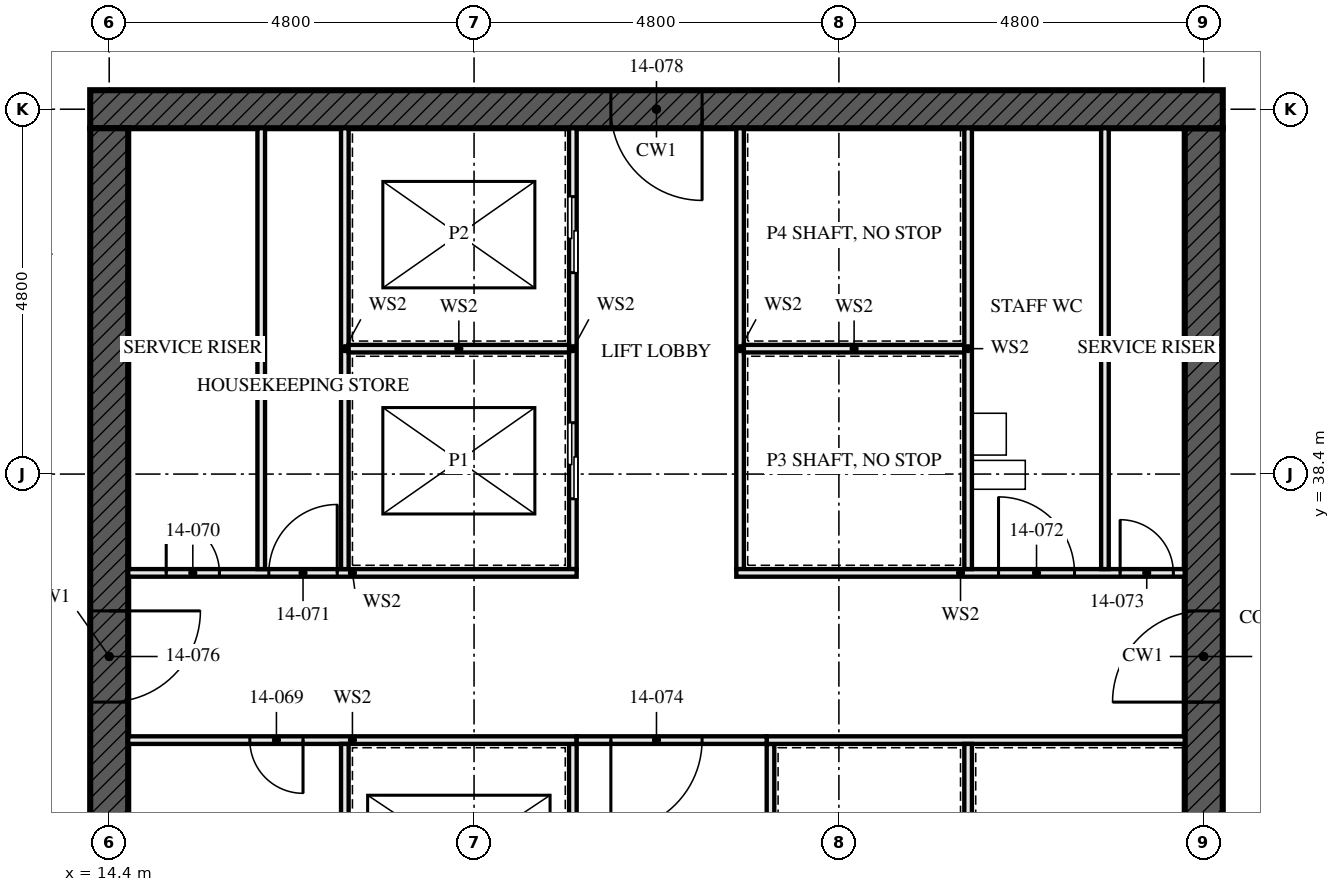
"""IFC4 building model, lengths in metres.
Left out: names, types, materials, properties, quantities, classifications, styles, units other than length and angle.
Written with IfcOpenShell. Run it as: python <this file> out.ifc"""

import sys

from ifc_helpers import new_model, si_unit, direction, frame, frame_2d, origin, place, context, subcontext, project, spatial, rectangle, extrude, element, fill, save


model = new_model("IFC4")
c1 = context("Model", 3, precision=1e-05, world=origin(), true_north=direction((0.0, 1.0)))
c2 = subcontext(c1, "Body", "Model", "MODEL_VIEW")
j1 = project(units=[si_unit("LENGTHUNIT", "METRE"), si_unit("PLANEANGLEUNIT", "RADIAN")], contexts=[c1])
p1 = place(None, origin())
s1 = spatial("IfcSite", under=j1, at=p1, CompositionType="ELEMENT")
p2 = place(p1, origin())
s2 = spatial("IfcBuilding", under=s1, at=p2, CompositionType="ELEMENT")
p3 = place(p2, frame((0.0, 0.0, 55.0)))
s3 = spatial("IfcBuildingStorey", under=s2, at=p3, CompositionType="ELEMENT", Elevation=55.0)
p4 = place(p3, frame((29.05, 43.2, -0.17), z_axis=(0.0, 0.0, 1.0), x_axis=(-1.0, 0.0, 0.0)))
e1 = element("IfcWall", 1, at=p4, inside=s3, PredefinedType="SHEAR", context=c2, shape_type="SweptSolid", body=[
    extrude(rectangle(XDim=14.9, YDim=0.5, at=frame_2d((7.45, 0.0))), origin(), (0.0, 0.0, 1.0), 3.5),
])
p5 = place(p4, frame((6.85, 0.0, 0.17)))
e2 = element("IfcOpeningElement", 2, at=p5, cuts=e1, PredefinedType="OPENING", context=c2, shape_type="SweptSolid", body=[
    extrude(rectangle(XDim=1.2, YDim=2.1, at=frame_2d((0.6, 1.05))), frame((0.0, 0.26, 0.0), z_axis=(0.0, -1.0, 0.0), x_axis=(1.0, 0.0, 0.0)), (0.0, 0.0, 1.0), 0.521),
])
p6 = place(p3, frame((14.4, 42.95, -0.17), z_axis=(0.0, 0.0, 1.0), x_axis=(0.0, -1.0, 0.0)))
e3 = element("IfcWall", 3, at=p6, inside=s3, PredefinedType="SHEAR", context=c2, shape_type="SweptSolid", body=[
    extrude(rectangle(XDim=13.9, YDim=0.5, at=frame_2d((6.95, 0.0))), origin(), (0.0, 0.0, 1.0), 3.5),
])
p7 = place(p6, frame((6.35, 0.0, 0.17)))
e4 = element("IfcOpeningElement", 4, at=p7, cuts=e3, PredefinedType="OPENING", context=c2, shape_type="SweptSolid", body=[
    extrude(rectangle(XDim=1.2, YDim=2.1, at=frame_2d((0.6, 1.05))), frame((0.0, 0.26, 0.0), z_axis=(0.0, -1.0, 0.0), x_axis=(1.0, 0.0, 0.0)), (0.0, 0.0, 1.0), 0.521),
])
p8 = place(p3, frame((28.8, 29.05, -0.17), z_axis=(0.0, 0.0, 1.0), x_axis=(0.0, 1.0, 0.0)))
e5 = element("IfcWall", 5, at=p8, inside=s3, PredefinedType="SHEAR", context=c2, shape_type="SweptSolid", body=[
    extrude(rectangle(XDim=13.9, YDim=0.5, at=frame_2d((6.95, 0.0))), origin(), (0.0, 0.0, 1.0), 3.5),
])
p9 = place(p8, frame((6.35, 0.0, 0.17)))
e6 = element("IfcOpeningElement", 6, at=p9, cuts=e5, PredefinedType="OPENING", context=c2, shape_type="SweptSolid", body=[
    extrude(rectangle(XDim=1.2, YDim=2.1, at=frame_2d((0.6, 1.05))), frame((0.0, 0.26, 0.0), z_axis=(0.0, -1.0, 0.0), x_axis=(1.0, 0.0, 0.0)), (0.0, 0.0, 1.0), 0.521),
])
for number, where, z_axis, x_axis in (
    (7, (16.4, 37.15, 0.0), (0.0, 0.0, 1.0), (0.0, 1.0, 0.0)),
    (8, (27.5, 37.15, 0.0), (0.0, 0.0, 1.0), (0.0, 1.0, 0.0)),
):
    element("IfcWall", number, at=place(p3, frame(where, z_axis=z_axis, x_axis=x_axis)), inside=s3, PredefinedType="SOLIDWALL", context=c2, shape_type="SweptSolid", body=[
        extrude(rectangle(XDim=5.8, YDim=0.1, at=frame_2d((2.9, 0.0))), origin(), (0.0, 0.0, 1.0), 3.33),
    ])
p10 = place(p3, frame((20.5, 29.05, 0.0), z_axis=(0.0, 0.0, 1.0), x_axis=(0.0, 1.0, 0.0)))
e9 = element("IfcWall", 9, at=p10, inside=s3, PredefinedType="SOLIDWALL", context=c2, shape_type="SweptSolid", body=[
    extrude(rectangle(XDim=5.8, YDim=0.1, at=frame_2d((2.9, 0.0))), origin(), (0.0, 0.0, 1.0), 3.33),
])
p11 = place(p10, frame((0.8, 0.0, 0.0)))
e10 = element("IfcOpeningElement", 10, at=p11, cuts=e9, PredefinedType="OPENING", context=c2, shape_type="SweptSolid", body=[
    extrude(rectangle(XDim=1.1, YDim=2.3, at=frame_2d((0.55, 1.15))), frame((0.0, 0.061, 0.0), z_axis=(0.0, -1.0, 0.0), x_axis=(1.0, 0.0, 0.0)), (0.0, 0.0, 1.0), 0.121),
])
p12 = place(p10, frame((3.775, 0.0, 0.0)))
e11 = element("IfcOpeningElement", 11, at=p12, cuts=e9, PredefinedType="OPENING", context=c2, shape_type="SweptSolid", body=[
    extrude(rectangle(XDim=1.1, YDim=2.3, at=frame_2d((0.55, 1.15))), frame((0.0, 0.061, 0.0), z_axis=(0.0, -1.0, 0.0), x_axis=(1.0, 0.0, 0.0)), (0.0, 0.0, 1.0), 0.121),
])
p13 = place(p3, frame((20.5, 37.15, 0.0), z_axis=(0.0, 0.0, 1.0), x_axis=(0.0, 1.0, 0.0)))
e12 = element("IfcWall", 12, at=p13, inside=s3, PredefinedType="SOLIDWALL", context=c2, shape_type="SweptSolid", body=[
    extrude(rectangle(XDim=5.8, YDim=0.1, at=frame_2d((2.9, 0.0))), origin(), (0.0, 0.0, 1.0), 3.33),
])
p14 = place(p13, frame((0.925, 0.0, 0.0)))
e13 = element("IfcOpeningElement", 13, at=p14, cuts=e12, PredefinedType="OPENING", context=c2, shape_type="SweptSolid", body=[
    extrude(rectangle(XDim=1.0, YDim=2.1, at=frame_2d((0.5, 1.05))), frame((0.0, 0.061, 0.0), z_axis=(0.0, -1.0, 0.0), x_axis=(1.0, 0.0, 0.0)), (0.0, 0.0, 1.0), 0.121),
])
p15 = place(p13, frame((3.9, 0.0, 0.0)))
e14 = element("IfcOpeningElement", 14, at=p15, cuts=e12, PredefinedType="OPENING", context=c2, shape_type="SweptSolid", body=[
    extrude(rectangle(XDim=1.0, YDim=2.1, at=frame_2d((0.5, 1.05))), frame((0.0, 0.061, 0.0), z_axis=(0.0, -1.0, 0.0), x_axis=(1.0, 0.0, 0.0)), (0.0, 0.0, 1.0), 0.121),
])
p16 = place(p3, frame((22.7, 37.15, 0.0), z_axis=(0.0, 0.0, 1.0), x_axis=(0.0, 1.0, 0.0)))
e15 = element("IfcWall", 15, at=p16, inside=s3, PredefinedType="SOLIDWALL", context=c2, shape_type="SweptSolid", body=[
    extrude(rectangle(XDim=5.8, YDim=0.1, at=frame_2d((2.9, 0.0))), origin(), (0.0, 0.0, 1.0), 3.33),
])
p17 = place(p3, frame((23.1, 29.05, 0.0), z_axis=(0.0, 0.0, 1.0), x_axis=(0.0, 1.0, 0.0)))
e16 = element("IfcWall", 16, at=p17, inside=s3, PredefinedType="SOLIDWALL", context=c2, shape_type="SweptSolid", body=[
    extrude(rectangle(XDim=5.8, YDim=0.1, at=frame_2d((2.9, 0.0))), origin(), (0.0, 0.0, 1.0), 3.33),
])
p18 = place(p17, frame((1.0, 0.0, 0.0)))
e17 = element("IfcOpeningElement", 17, at=p18, cuts=e16, PredefinedType="OPENING", context=c2, shape_type="SweptSolid", body=[
    extrude(rectangle(XDim=0.7, YDim=2.1, at=frame_2d((0.35, 1.05))), frame((0.0, 0.061, 0.0), z_axis=(0.0, -1.0, 0.0), x_axis=(1.0, 0.0, 0.0)), (0.0, 0.0, 1.0), 0.121),
])
p19 = place(p3, frame((14.65, 34.9, 0.0), z_axis=(0.0, 0.0, 1.0), x_axis=(1.0, 0.0, 0.0)))
e18 = element("IfcWall", 18, at=p19, inside=s3, PredefinedType="SOLIDWALL", context=c2, shape_type="SweptSolid", body=[
    extrude(rectangle(XDim=5.9, YDim=0.1, at=frame_2d((2.95, 0.0))), origin(), (0.0, 0.0, 1.0), 3.33),
])
p20 = place(p19, frame((1.6, 0.0, 0.0)))
e19 = element("IfcOpeningElement", 19, at=p20, cuts=e18, PredefinedType="OPENING", context=c2, shape_type="SweptSolid", body=[
    extrude(rectangle(XDim=0.7, YDim=2.1, at=frame_2d((0.35, 1.05))), frame((0.0, 0.061, 0.0), z_axis=(0.0, -1.0, 0.0), x_axis=(1.0, 0.0, 0.0)), (0.0, 0.0, 1.0), 0.121),
])
p21 = place(p3, frame((23.05, 34.9, 0.0), z_axis=(0.0, 0.0, 1.0), x_axis=(1.0, 0.0, 0.0)))
e20 = element("IfcWall", 20, at=p21, inside=s3, PredefinedType="SOLIDWALL", context=c2, shape_type="SweptSolid", body=[
    extrude(rectangle(XDim=5.5, YDim=0.1, at=frame_2d((2.75, 0.0))), origin(), (0.0, 0.0, 1.0), 3.33),
])
p22 = place(p3, frame((14.65, 37.1, 0.0), z_axis=(0.0, 0.0, 1.0), x_axis=(1.0, 0.0, 0.0)))
e21 = element("IfcWall", 21, at=p22, inside=s3, PredefinedType="SOLIDWALL", context=c2, shape_type="SweptSolid", body=[
    extrude(rectangle(XDim=5.9, YDim=0.1, at=frame_2d((2.95, 0.0))), origin(), (0.0, 0.0, 1.0), 3.33),
])
p23 = place(p22, frame((0.5, 0.0, 0.0)))
e22 = element("IfcOpeningElement", 22, at=p23, cuts=e21, PredefinedType="OPENING", context=c2, shape_type="SweptSolid", body=[
    extrude(rectangle(XDim=0.7, YDim=2.1, at=frame_2d((0.35, 1.05))), frame((0.0, 0.061, 0.0), z_axis=(0.0, -1.0, 0.0), x_axis=(1.0, 0.0, 0.0)), (0.0, 0.0, 1.0), 0.121),
])
p24 = place(p22, frame((1.85, 0.0, 0.0)))
e23 = element("IfcOpeningElement", 23, at=p24, cuts=e21, PredefinedType="OPENING", context=c2, shape_type="SweptSolid", body=[
    extrude(rectangle(XDim=0.9, YDim=2.1, at=frame_2d((0.45, 1.05))), frame((0.0, 0.061, 0.0), z_axis=(0.0, -1.0, 0.0), x_axis=(1.0, 0.0, 0.0)), (0.0, 0.0, 1.0), 0.121),
])
p25 = place(p3, frame((22.65, 37.1, 0.0), z_axis=(0.0, 0.0, 1.0), x_axis=(1.0, 0.0, 0.0)))
e24 = element("IfcWall", 24, at=p25, inside=s3, PredefinedType="SOLIDWALL", context=c2, shape_type="SweptSolid", body=[
    extrude(rectangle(XDim=5.9, YDim=0.1, at=frame_2d((2.95, 0.0))), origin(), (0.0, 0.0, 1.0), 3.33),
])
p26 = place(p25, frame((3.45, 0.0, 0.0)))
e25 = element("IfcOpeningElement", 25, at=p26, cuts=e24, PredefinedType="OPENING", context=c2, shape_type="SweptSolid", body=[
    extrude(rectangle(XDim=1.0, YDim=2.1, at=frame_2d((0.5, 1.05))), frame((0.0, 0.061, 0.0), z_axis=(0.0, -1.0, 0.0), x_axis=(1.0, 0.0, 0.0)), (0.0, 0.0, 1.0), 0.121),
])
p27 = place(p25, frame((5.05, 0.0, 0.0)))
e26 = element("IfcOpeningElement", 26, at=p27, cuts=e24, PredefinedType="OPENING", context=c2, shape_type="SweptSolid", body=[
    extrude(rectangle(XDim=0.7, YDim=2.1, at=frame_2d((0.35, 1.05))), frame((0.0, 0.061, 0.0), z_axis=(0.0, -1.0, 0.0), x_axis=(1.0, 0.0, 0.0)), (0.0, 0.0, 1.0), 0.121),
])
p28 = place(p3, frame((20.55, 34.9, 0.0), z_axis=(0.0, 0.0, 1.0), x_axis=(1.0, 0.0, 0.0)))
e27 = element("IfcWall", 27, at=p28, inside=s3, PredefinedType="SOLIDWALL", context=c2, shape_type="SweptSolid", body=[
    extrude(rectangle(XDim=2.5, YDim=0.1, at=frame_2d((1.25, 0.0))), origin(), (0.0, 0.0, 1.0), 3.33),
])
p29 = place(p28, frame((0.45, 0.0, 0.0)))
e28 = element("IfcOpeningElement", 28, at=p29, cuts=e27, PredefinedType="OPENING", context=c2, shape_type="SweptSolid", body=[
    extrude(rectangle(XDim=1.2, YDim=2.1, at=frame_2d((0.6, 1.05))), frame((0.0, 0.061, 0.0), z_axis=(0.0, -1.0, 0.0), x_axis=(1.0, 0.0, 0.0)), (0.0, 0.0, 1.0), 0.121),
])
for number, where, z_axis, x_axis in (
    (29, (17.5, 29.05, 0.0), (0.0, 0.0, 1.0), (0.0, 1.0, 0.0)),
    (30, (17.5, 37.15, 0.0), (0.0, 0.0, 1.0), (0.0, 1.0, 0.0)),
):
    element("IfcWall", number, at=place(p3, frame(where, z_axis=z_axis, x_axis=x_axis)), inside=s3, PredefinedType="SOLIDWALL", context=c2, shape_type="SweptSolid", body=[
        extrude(rectangle(XDim=5.8, YDim=0.1, at=frame_2d((2.9, 0.0))), origin(), (0.0, 0.0, 1.0), 3.33),
    ])
for number, where, z_axis, x_axis in (
    (31, (17.55, 40.05, 0.0), (0.0, 0.0, 1.0), (1.0, 0.0, 0.0)),
    (32, (22.75, 40.05, 0.0), (0.0, 0.0, 1.0), (1.0, 0.0, 0.0)),
):
    element("IfcWall", number, at=place(p3, frame(where, z_axis=z_axis, x_axis=x_axis)), inside=s3, PredefinedType="SOLIDWALL", context=c2, shape_type="SweptSolid", body=[
        extrude(rectangle(XDim=2.9, YDim=0.1, at=frame_2d((1.45, 0.0))), origin(), (0.0, 0.0, 1.0), 3.33),
    ])
p30 = place(p3, frame((25.7, 37.15, 0.0), z_axis=(0.0, 0.0, 1.0), x_axis=(0.0, 1.0, 0.0)))
e33 = element("IfcWall", 33, at=p30, inside=s3, PredefinedType="SOLIDWALL", context=c2, shape_type="SweptSolid", body=[
    extrude(rectangle(XDim=5.8, YDim=0.1, at=frame_2d((2.9, 0.0))), origin(), (0.0, 0.0, 1.0), 3.33),
])
p31 = place(p3, frame((25.7, 31.95, 0.0), z_axis=(0.0, 0.0, 1.0), x_axis=(0.0, 1.0, 0.0)))
e34 = element("IfcWall", 34, at=p31, inside=s3, PredefinedType="SOLIDWALL", context=c2, shape_type="SweptSolid", body=[
    extrude(rectangle(XDim=2.9, YDim=0.1, at=frame_2d((1.45, 0.0))), origin(), (0.0, 0.0, 1.0), 3.33),
])
p32 = place(p14, origin())
e35 = element("IfcDoor", 35, at=p32, inside=s3, OperationType="SLIDING_TO_LEFT", PredefinedType="DOOR", context=c2, shape_type="SweptSolid", body=[
    extrude(rectangle(XDim=1.0, YDim=2.1, at=frame_2d((0.5, 1.05))), frame((0.0, 0.05, 0.0), z_axis=(0.0, -1.0, 0.0), x_axis=(1.0, 0.0, 0.0)), (0.0, 0.0, 1.0), 0.1),
])
fill(e13, e35)
p33 = place(p15, origin())
e36 = element("IfcDoor", 36, at=p33, inside=s3, OperationType="SLIDING_TO_LEFT", PredefinedType="DOOR", context=c2, shape_type="SweptSolid", body=[
    extrude(rectangle(XDim=1.0, YDim=2.1, at=frame_2d((0.5, 1.05))), frame((0.0, 0.05, 0.0), z_axis=(0.0, -1.0, 0.0), x_axis=(1.0, 0.0, 0.0)), (0.0, 0.0, 1.0), 0.1),
])
fill(e14, e36)
p34 = place(p20, frame((0.7, 0.0, 0.0), z_axis=(0.0, 0.0, 1.0), x_axis=(-1.0, 0.0, 0.0)))
e37 = element("IfcDoor", 37, at=p34, inside=s3, OperationType="SINGLE_SWING_RIGHT", PredefinedType="DOOR", context=c2, shape_type="SweptSolid", body=[
    extrude(rectangle(XDim=0.7, YDim=2.1, at=frame_2d((0.35, 1.05))), frame((0.0, 0.027, 0.0), z_axis=(0.0, -1.0, 0.0), x_axis=(1.0, 0.0, 0.0)), (0.0, 0.0, 1.0), 0.054),
])
fill(e19, e37)
p35 = place(p23, origin())
e38 = element("IfcDoor", 38, at=p35, inside=s3, OperationType="SINGLE_SWING_RIGHT", PredefinedType="DOOR", context=c2, shape_type="SweptSolid", body=[
    extrude(rectangle(XDim=0.7, YDim=2.1, at=frame_2d((0.35, 1.05))), frame((0.0, 0.027, 0.0), z_axis=(0.0, -1.0, 0.0), x_axis=(1.0, 0.0, 0.0)), (0.0, 0.0, 1.0), 0.054),
])
fill(e22, e38)
p36 = place(p24, origin())
e39 = element("IfcDoor", 39, at=p36, inside=s3, OperationType="SINGLE_SWING_LEFT", PredefinedType="DOOR", context=c2, shape_type="SweptSolid", body=[
    extrude(rectangle(XDim=0.9, YDim=2.1, at=frame_2d((0.45, 1.05))), frame((0.0, 0.027, 0.0), z_axis=(0.0, -1.0, 0.0), x_axis=(1.0, 0.0, 0.0)), (0.0, 0.0, 1.0), 0.054),
])
fill(e23, e39)
p37 = place(p26, origin())
e40 = element("IfcDoor", 40, at=p37, inside=s3, OperationType="SINGLE_SWING_RIGHT", PredefinedType="DOOR", context=c2, shape_type="SweptSolid", body=[
    extrude(rectangle(XDim=1.0, YDim=2.1, at=frame_2d((0.5, 1.05))), frame((0.0, 0.027, 0.0), z_axis=(0.0, -1.0, 0.0), x_axis=(1.0, 0.0, 0.0)), (0.0, 0.0, 1.0), 0.054),
])
fill(e25, e40)
p38 = place(p27, origin())
e41 = element("IfcDoor", 41, at=p38, inside=s3, OperationType="SINGLE_SWING_RIGHT", PredefinedType="DOOR", context=c2, shape_type="SweptSolid", body=[
    extrude(rectangle(XDim=0.7, YDim=2.1, at=frame_2d((0.35, 1.05))), frame((0.0, 0.027, 0.0), z_axis=(0.0, -1.0, 0.0), x_axis=(1.0, 0.0, 0.0)), (0.0, 0.0, 1.0), 0.054),
])
fill(e26, e41)
p39 = place(p29, frame((1.2, 0.0, 0.0), z_axis=(0.0, 0.0, 1.0), x_axis=(-1.0, 0.0, 0.0)))
e42 = element("IfcDoor", 42, at=p39, inside=s3, OperationType="SINGLE_SWING_LEFT", PredefinedType="DOOR", context=c2, shape_type="SweptSolid", body=[
    extrude(rectangle(XDim=1.2, YDim=2.1, at=frame_2d((0.6, 1.05))), frame((0.0, 0.027, 0.0), z_axis=(0.0, -1.0, 0.0), x_axis=(1.0, 0.0, 0.0)), (0.0, 0.0, 1.0), 0.054),
])
fill(e28, e42)
p40 = place(p7, origin())
e43 = element("IfcDoor", 43, at=p40, inside=s3, OperationType="SINGLE_SWING_LEFT", PredefinedType="DOOR", context=c2, shape_type="SweptSolid", body=[
    extrude(rectangle(XDim=1.2, YDim=2.1, at=frame_2d((0.6, 1.05))), frame((0.0, 0.027, 0.0), z_axis=(0.0, -1.0, 0.0), x_axis=(1.0, 0.0, 0.0)), (0.0, 0.0, 1.0), 0.054),
])
fill(e4, e43)
p41 = place(p9, origin())
e44 = element("IfcDoor", 44, at=p41, inside=s3, OperationType="SINGLE_SWING_LEFT", PredefinedType="DOOR", context=c2, shape_type="SweptSolid", body=[
    extrude(rectangle(XDim=1.2, YDim=2.1, at=frame_2d((0.6, 1.05))), frame((0.0, 0.027, 0.0), z_axis=(0.0, -1.0, 0.0), x_axis=(1.0, 0.0, 0.0)), (0.0, 0.0, 1.0), 0.054),
])
fill(e6, e44)
p42 = place(p5, origin())
e45 = element("IfcDoor", 45, at=p42, inside=s3, OperationType="SINGLE_SWING_LEFT", PredefinedType="DOOR", context=c2, shape_type="SweptSolid", body=[
    extrude(rectangle(XDim=1.2, YDim=2.1, at=frame_2d((0.6, 1.05))), frame((0.0, 0.027, 0.0), z_axis=(0.0, -1.0, 0.0), x_axis=(1.0, 0.0, 0.0)), (0.0, 0.0, 1.0), 0.054),
])
fill(e2, e45)
save(model, sys.argv[1])
